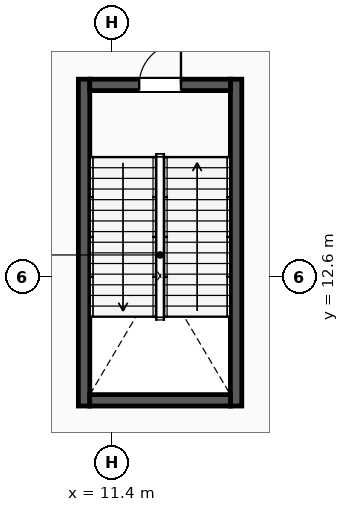
"""IFC4 building model, lengths in metres.
Left out: names, types, materials, properties, quantities, classifications, styles, units other than length and angle.
Written with IfcOpenShell. Run it as: python <this file> out.ifc"""

import sys

from ifc_helpers import new_model, si_unit, direction, frame, frame_2d, origin, place, context, subcontext, project, spatial, rectangle, extrude, element, fill, save


model = new_model("IFC4")
c1 = context("Model", 3, precision=1e-05, world=origin(), true_north=direction((0.0, 1.0)))
c2 = subcontext(c1, "Body", "Model", "MODEL_VIEW")
j1 = project(units=[si_unit("LENGTHUNIT", "METRE"), si_unit("PLANEANGLEUNIT", "RADIAN")], contexts=[c1])
p1 = place(None, origin())
s1 = spatial("IfcSite", under=j1, at=p1, CompositionType="ELEMENT")
p2 = place(p1, origin())
s2 = spatial("IfcBuilding", under=s1, at=p2, CompositionType="ELEMENT")
p3 = place(p2, frame((0.0, 0.0, 6.0)))
s3 = spatial("IfcBuildingStorey", under=s2, at=p3, CompositionType="ELEMENT", Elevation=6.0)
for number, where, z_axis, x_axis in (
    (1, (10.67, 9.2, 0.0), (0.0, 0.0, 1.0), (0.0, 1.0, 0.0)),
    (2, (14.67, 9.2, 0.0), (0.0, 0.0, 1.0), (0.0, 1.0, 0.0)),
):
    element("IfcWall", number, at=place(p3, frame(where, z_axis=z_axis, x_axis=x_axis)), inside=s3, PredefinedType="SHEAR", context=c2, shape_type="SweptSolid", body=[
        extrude(rectangle(XDim=8.6, YDim=0.3, at=frame_2d((4.3, 0.0))), origin(), (0.0, 0.0, 1.0), 5.65),
    ])
p4 = place(p3, frame((10.82, 17.65, 0.0), z_axis=(0.0, 0.0, 1.0), x_axis=(1.0, 0.0, 0.0)))
e3 = element("IfcWall", 3, at=p4, inside=s3, PredefinedType="SHEAR", context=c2, shape_type="SweptSolid", body=[
    extrude(rectangle(XDim=3.7, YDim=0.3, at=frame_2d((1.85, 0.0))), origin(), (0.0, 0.0, 1.0), 5.65),
])
p5 = place(p4, frame((1.3, 0.0, 0.0)))
e4 = element("IfcOpeningElement", 4, at=p5, cuts=e3, PredefinedType="OPENING", context=c2, shape_type="SweptSolid", body=[
    extrude(rectangle(XDim=1.1, YDim=2.15, at=frame_2d((0.55, 1.075))), frame((0.0, 0.16, 0.0), z_axis=(0.0, -1.0, 0.0), x_axis=(1.0, 0.0, 0.0)), (0.0, 0.0, 1.0), 0.32),
])
p6 = place(p3, frame((10.82, 9.35, 0.0), z_axis=(0.0, 0.0, 1.0), x_axis=(1.0, 0.0, 0.0)))
e5 = element("IfcWall", 5, at=p6, inside=s3, PredefinedType="SHEAR", context=c2, shape_type="SweptSolid", body=[
    extrude(rectangle(XDim=3.7, YDim=0.3, at=frame_2d((1.85, 0.0))), origin(), (0.0, 0.0, 1.0), 5.65),
])
p7 = place(p5, origin())
e6 = element("IfcDoor", 6, at=p7, inside=s3, OperationType="SINGLE_SWING_RIGHT", PredefinedType="DOOR", context=c2, shape_type="SweptSolid", body=[
    extrude(rectangle(XDim=1.1, YDim=2.15, at=frame_2d((0.55, 1.075))), frame((0.0, 0.025, 0.0), z_axis=(0.0, -1.0, 0.0), x_axis=(1.0, 0.0, 0.0)), (0.0, 0.0, 1.0), 0.05),
])
fill(e4, e6)
save(model, sys.argv[1])
